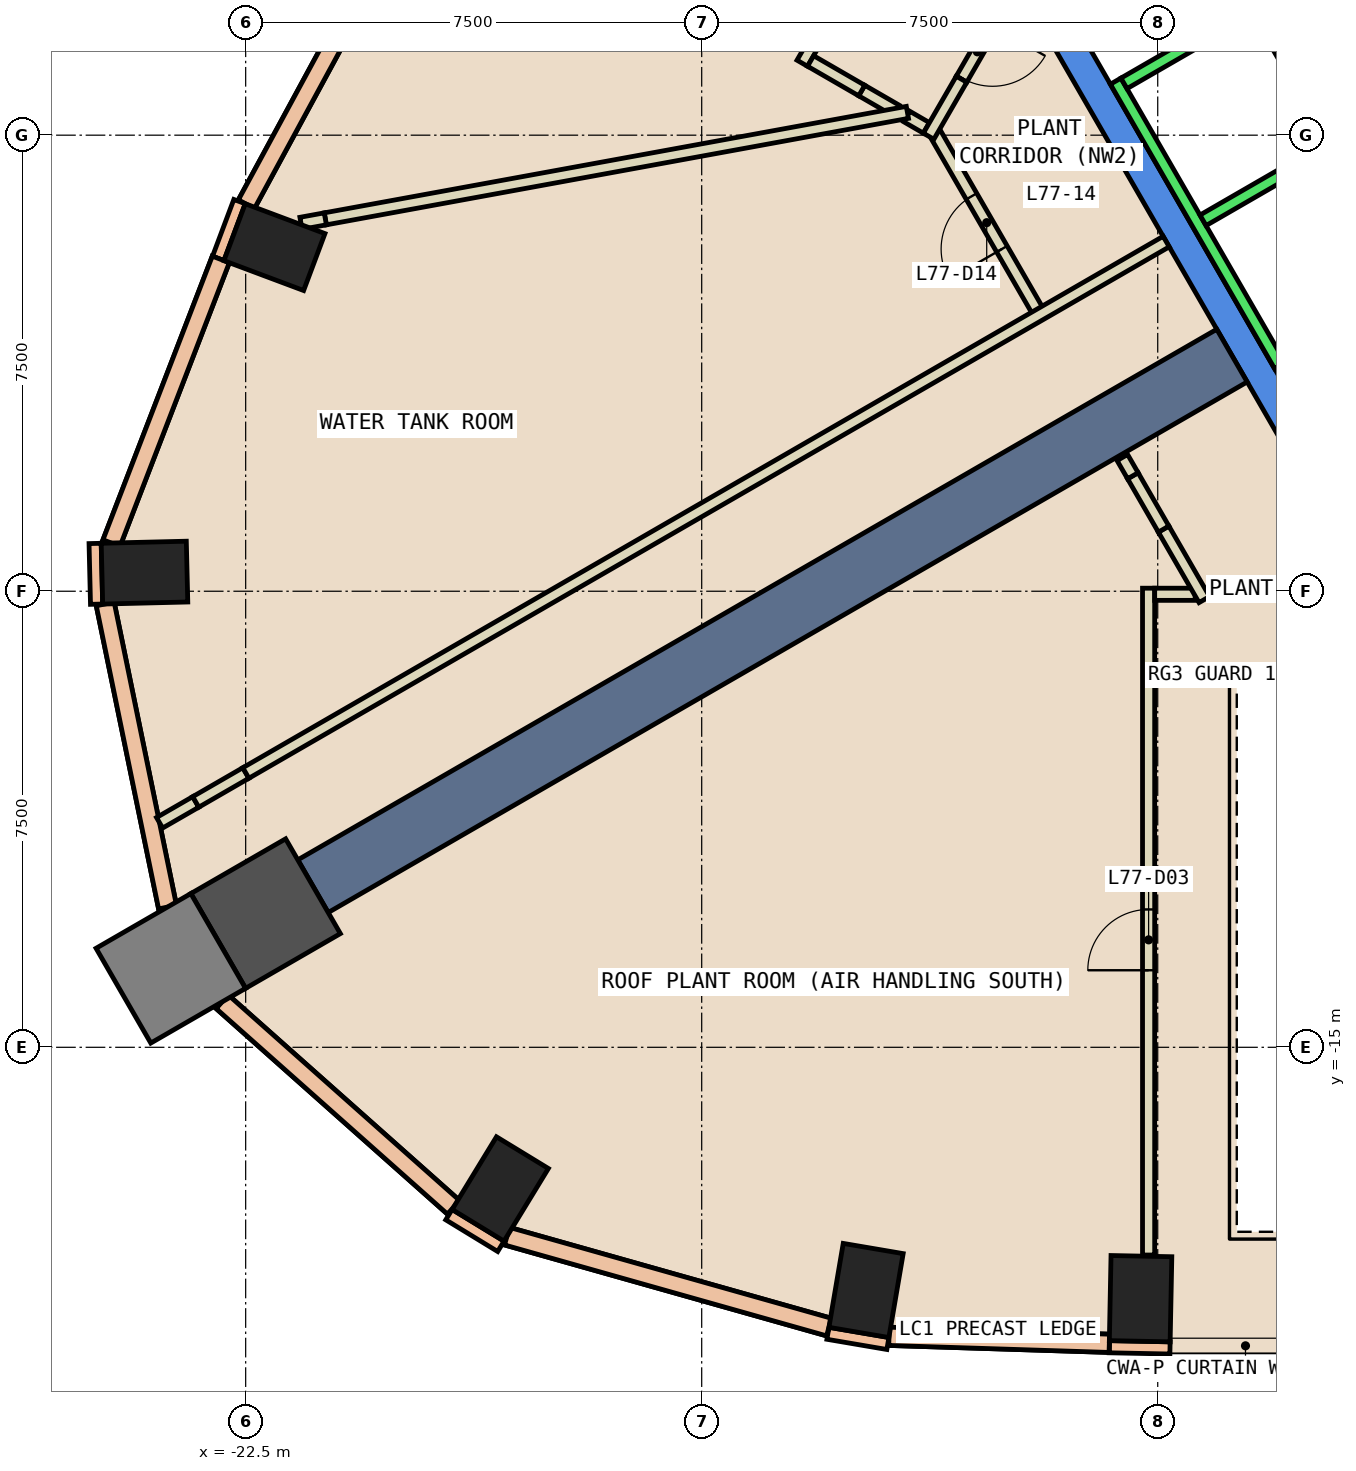
"""IFC4 building model, lengths in metres.
Left out: names, types, materials, properties, quantities, classifications, styles, units other than length and angle.
Written with IfcOpenShell. Run it as: python <this file> out.ifc"""

import sys

from ifc_helpers import new_model, si_unit, direction, frame, frame_2d, origin, origin_2d, place, context, subcontext, project, spatial, polyline, rectangle, outline, extrude, element, fill, save


model = new_model("IFC4")
c1 = context("Model", 3, precision=1e-05, world=origin(), true_north=direction((0.0, 1.0)))
c2 = subcontext(c1, "Body", "Model", "MODEL_VIEW")
j1 = project(units=[si_unit("LENGTHUNIT", "METRE"), si_unit("PLANEANGLEUNIT", "RADIAN")], contexts=[c1])
p1 = place(None, origin())
s1 = spatial("IfcSite", under=j1, at=p1, CompositionType="ELEMENT")
p2 = place(p1, origin())
s2 = spatial("IfcBuilding", under=s1, at=p2, CompositionType="ELEMENT")
p3 = place(p2, frame((0.0, 0.0, 326.0)))
s3 = spatial("IfcBuildingStorey", under=s2, at=p3, CompositionType="ELEMENT", Elevation=326.0)
for number, where, z_axis, x_axis in (
    (1, (-12.297, -18.999, -0.6), (0.0, 0.0, 1.0), (-0.986, 0.168, 0.0)),
    (2, (-7.782, -19.134, -0.6), (0.0, 0.0, 1.0), (-1.0, 0.02, 0.0)),
    (3, (-22.027, -1.841, -0.6), (0.0, 0.0, 1.0), (0.351, 0.936, 0.0)),
    (4, (-24.164, -7.194, -0.6), (0.0, 0.0, 1.0), (-0.024, 1.0, 0.0)),
):
    element("IfcColumn", number, at=place(p3, frame(where, z_axis=z_axis, x_axis=x_axis)), inside=s3, PredefinedType="COLUMN", context=c2, shape_type="SweptSolid", body=[
        extrude(rectangle(XDim=1.0, YDim=1.4, at=origin_2d()), origin(), (0.0, 0.0, 1.0), 5.55),
    ])
p4 = place(p3, frame((-22.172, -12.801, -0.6), z_axis=(0.0, 0.0, 1.0), x_axis=(0.866025403784, 0.5, 0.0)))
e5 = element("IfcColumn", 5, at=p4, inside=s3, PredefinedType="COLUMN", context=c2, shape_type="SweptSolid", body=[
    extrude(rectangle(XDim=1.8, YDim=1.8, at=origin_2d()), origin(), (0.0, 0.0, 1.0), 5.55),
])
p5 = place(p3, frame((-18.313, -17.33, -0.6), z_axis=(0.0, 0.0, 1.0), x_axis=(-0.853650808213, 0.520845752251, 0.0)))
e6 = element("IfcColumn", 6, at=p5, inside=s3, PredefinedType="COLUMN", context=c2, shape_type="SweptSolid", body=[
    extrude(rectangle(XDim=1.0, YDim=1.4, at=origin_2d()), origin(), (0.0, 0.0, 1.0), 5.55),
])
p6 = place(p3, frame((-23.731, -13.701, -0.6), z_axis=(0.0, 0.0, 1.0), x_axis=(0.866025403784, 0.5, 0.0)))
e7 = element("IfcColumn", 7, at=p6, inside=s3, PredefinedType="COLUMN", context=c2, shape_type="SweptSolid", body=[
    extrude(rectangle(XDim=1.8, YDim=1.8, at=origin_2d()), origin(), (0.0, 0.0, 1.0), 5.55),
])
p7 = place(p3, frame((0.0, 0.0, -0.6)))
e8 = element("IfcWall", 8, at=p7, inside=s3, PredefinedType="SHEAR", context=c2, shape_type="SweptSolid", body=[
    extrude(outline(polyline([(-9.815, 2.5), (-4.907, -6.0), (-4.619, -5.5), (-9.238, 2.5), (-9.815, 2.5)])), origin(), (0.0, 0.0, 1.0), 5.55),
])
p8 = place(p3, frame((-6.279, -3.625, 0.0), z_axis=(0.0, 0.0, 1.0), x_axis=(-0.866025543801, -0.499999757484, 0.0)))
e9 = element("IfcWall", 9, at=p8, inside=s3, PredefinedType="SHEAR", context=c2, shape_type="SweptSolid", body=[
    extrude(rectangle(XDim=17.452, YDim=1.0, at=frame_2d((8.726, 0.0))), origin(), (0.0, 0.0, 1.0), 4.95),
])
p9 = place(p3, frame((-22.601, -1.092, 0.0), z_axis=(0.0, 0.0, 1.0), x_axis=(-0.350962844851, -0.936389385637, 0.0)))
e10 = element("IfcWall", 10, at=p9, inside=s3, PredefinedType="STANDARD", context=c2, shape_type="SweptSolid", body=[
    extrude(rectangle(XDim=1.0, YDim=0.2, at=frame_2d((0.5, 0.0))), origin(), (0.0, 0.0, 1.0), 4.95),
])
for number, where, z_axis, x_axis in (
    (11, (-12.924, -19.703, 0.0), (0.0, 0.0, 1.0), (0.986, -0.168, 0.0)),
    (12, (-8.298, -19.924, 0.0), (0.0, 0.0, 1.0), (1.0, -0.02, 0.0)),
):
    element("IfcWall", number, at=place(p3, frame(where, z_axis=z_axis, x_axis=x_axis)), inside=s3, PredefinedType="STANDARD", context=c2, shape_type="SweptSolid", body=[
        extrude(rectangle(XDim=1.0, YDim=0.2, at=frame_2d((0.5, 0.0))), origin(), (0.0, 0.0, 1.0), 4.95),
    ])
p10 = place(p3, frame((-24.976, -6.714, 0.0), z_axis=(0.0, 0.0, 1.0), x_axis=(0.024192379573, -0.999707321555, 0.0)))
e13 = element("IfcWall", 13, at=p10, inside=s3, PredefinedType="STANDARD", context=c2, shape_type="SweptSolid", body=[
    extrude(rectangle(XDim=0.999, YDim=0.2, at=frame_2d((0.5, 0.0))), origin(), (0.0, 0.0, 1.0), 4.95),
])
p11 = place(p3, frame((-19.157, -17.752, 0.0), z_axis=(0.0, 0.0, 1.0), x_axis=(0.853679739553, -0.520798331677, 0.0)))
e14 = element("IfcWall", 14, at=p11, inside=s3, PredefinedType="STANDARD", context=c2, shape_type="SweptSolid", body=[
    extrude(rectangle(XDim=1.0, YDim=0.2, at=frame_2d((0.5, 0.0))), origin(), (0.0, 0.0, 1.0), 4.95),
])
p12 = place(p3, frame((-11.919, -19.753, 0.0), z_axis=(0.0, 0.0, 1.0), x_axis=(0.9994967126, -0.031722570865, 0.0)))
e15 = element("IfcWall", 15, at=p12, inside=s3, PredefinedType="STANDARD", context=c2, shape_type="SweptSolid", body=[
    extrude(rectangle(XDim=3.625, YDim=0.3, at=frame_2d((1.812, 0.0))), origin(), (0.0, 0.0, 1.0), 1.2),
])
p13 = place(p3, frame((-11.919, -19.753, 4.15), z_axis=(0.0, 0.0, 1.0), x_axis=(0.9994967126, -0.031722570865, 0.0)))
e16 = element("IfcWall", 16, at=p13, inside=s3, PredefinedType="STANDARD", context=c2, shape_type="SweptSolid", body=[
    extrude(rectangle(XDim=3.625, YDim=0.3, at=frame_2d((1.812, 0.0))), origin(), (0.0, 0.0, 1.0), 0.8),
])
p14 = place(p3, frame((-18.887, 5.504, 0.0), z_axis=(0.0, 0.0, 1.0), x_axis=(-0.476794367741, -0.879014863862, 0.0)))
e17 = element("IfcWall", 17, at=p14, inside=s3, PredefinedType="STANDARD", context=c2, shape_type="SweptSolid", body=[
    extrude(rectangle(XDim=7.553, YDim=0.3, at=frame_2d((3.776, 0.0))), origin(), (0.0, 0.0, 1.0), 1.2),
])
p15 = place(p3, frame((-18.887, 5.504, 4.15), z_axis=(0.0, 0.0, 1.0), x_axis=(-0.476794367741, -0.879014863862, 0.0)))
e18 = element("IfcWall", 18, at=p15, inside=s3, PredefinedType="STANDARD", context=c2, shape_type="SweptSolid", body=[
    extrude(rectangle(XDim=7.553, YDim=0.3, at=frame_2d((3.776, 0.0))), origin(), (0.0, 0.0, 1.0), 0.8),
])
p16 = place(p3, frame((-22.909, -2.043, 0.0), z_axis=(0.0, 0.0, 1.0), x_axis=(-0.35964980127, -0.933087359493, 0.0)))
e19 = element("IfcWall", 19, at=p16, inside=s3, PredefinedType="STANDARD", context=c2, shape_type="SweptSolid", body=[
    extrude(rectangle(XDim=5.0, YDim=0.3, at=frame_2d((2.5, 0.0))), origin(), (0.0, 0.0, 1.0), 1.2),
])
p17 = place(p3, frame((-22.909, -2.043, 4.15), z_axis=(0.0, 0.0, 1.0), x_axis=(-0.35964980127, -0.933087359493, 0.0)))
e20 = element("IfcWall", 20, at=p17, inside=s3, PredefinedType="STANDARD", context=c2, shape_type="SweptSolid", body=[
    extrude(rectangle(XDim=5.0, YDim=0.3, at=frame_2d((2.5, 0.0))), origin(), (0.0, 0.0, 1.0), 0.8),
])
p18 = place(p3, frame((-24.81, -7.709, 0.0), z_axis=(0.0, 0.0, 1.0), x_axis=(0.201426878117, -0.979503554242, 0.0)))
e21 = element("IfcWall", 21, at=p18, inside=s3, PredefinedType="STANDARD", context=c2, shape_type="SweptSolid", body=[
    extrude(rectangle(XDim=5.089, YDim=0.3, at=frame_2d((2.545, 0.0))), origin(), (0.0, 0.0, 1.0), 1.2),
])
p19 = place(p3, frame((-24.81, -7.709, 4.15), z_axis=(0.0, 0.0, 1.0), x_axis=(0.201426878117, -0.979503554242, 0.0)))
e22 = element("IfcWall", 22, at=p19, inside=s3, PredefinedType="STANDARD", context=c2, shape_type="SweptSolid", body=[
    extrude(rectangle(XDim=5.089, YDim=0.3, at=frame_2d((2.545, 0.0))), origin(), (0.0, 0.0, 1.0), 0.8),
])
p20 = place(p3, frame((-22.886, -14.251, 0.0), z_axis=(0.0, 0.0, 1.0), x_axis=(0.74752312802, -0.664235781236, 0.0)))
e23 = element("IfcWall", 23, at=p20, inside=s3, PredefinedType="STANDARD", context=c2, shape_type="SweptSolid", body=[
    extrude(rectangle(XDim=5.089, YDim=0.3, at=frame_2d((2.544, 0.0))), origin(), (0.0, 0.0, 1.0), 1.2),
])
p21 = place(p3, frame((-22.886, -14.251, 4.15), z_axis=(0.0, 0.0, 1.0), x_axis=(0.74752312802, -0.664235781236, 0.0)))
e24 = element("IfcWall", 24, at=p21, inside=s3, PredefinedType="STANDARD", context=c2, shape_type="SweptSolid", body=[
    extrude(rectangle(XDim=5.089, YDim=0.3, at=frame_2d((2.544, 0.0))), origin(), (0.0, 0.0, 1.0), 0.8),
])
p22 = place(p3, frame((-18.202, -18.106, 0.0), z_axis=(0.0, 0.0, 1.0), x_axis=(0.962383071313, -0.271696198079, 0.0)))
e25 = element("IfcWall", 25, at=p22, inside=s3, PredefinedType="STANDARD", context=c2, shape_type="SweptSolid", body=[
    extrude(rectangle(XDim=5.503, YDim=0.3, at=frame_2d((2.751, 0.0))), origin(), (0.0, 0.0, 1.0), 1.2),
])
p23 = place(p3, frame((-18.202, -18.106, 4.15), z_axis=(0.0, 0.0, 1.0), x_axis=(0.962383071313, -0.271696198079, 0.0)))
e26 = element("IfcWall", 26, at=p23, inside=s3, PredefinedType="STANDARD", context=c2, shape_type="SweptSolid", body=[
    extrude(rectangle(XDim=5.503, YDim=0.3, at=frame_2d((2.751, 0.0))), origin(), (0.0, 0.0, 1.0), 0.8),
])
p24 = place(p3, frame((-7.65, -18.416, 0.0), z_axis=(0.0, 0.0, 1.0), x_axis=(0.0, 1.0, 0.0)))
e27 = element("IfcWall", 27, at=p24, inside=s3, PredefinedType="PARTITIONING", context=c2, shape_type="SweptSolid", body=[
    extrude(rectangle(XDim=10.966, YDim=0.2, at=frame_2d((5.483, 0.0))), origin(), (0.0, 0.0, 1.0), 4.95),
])
p25 = place(p24, frame((4.683, 0.0, 0.0)))
e28 = element("IfcOpeningElement", 28, at=p25, cuts=e27, PredefinedType="OPENING", context=c2, shape_type="SweptSolid", body=[
    extrude(rectangle(XDim=1.0, YDim=2.1, at=frame_2d((0.5, 1.05))), frame((0.0, 0.11, 0.0), z_axis=(0.0, -1.0, 0.0), x_axis=(1.0, 0.0, 0.0)), (0.0, 0.0, 1.0), 0.22),
])
p26 = place(p3, frame((-7.55, -7.55, 0.0), z_axis=(0.0, 0.0, 1.0), x_axis=(1.0, 0.0, 0.0)))
e29 = element("IfcWall", 29, at=p26, inside=s3, PredefinedType="PARTITIONING", context=c2, shape_type="SweptSolid", body=[
    extrude(rectangle(XDim=0.666, YDim=0.2, at=frame_2d((0.333, 0.0))), origin(), (0.0, 0.0, 1.0), 4.95),
])
p27 = place(p3, frame((-6.734, -7.637, 0.0), z_axis=(0.0, 0.0, 1.0), x_axis=(-0.500043546414, 0.866000260791, 0.0)))
e30 = element("IfcWall", 30, at=p27, inside=s3, PredefinedType="PARTITIONING", context=c2, shape_type="SweptSolid", body=[
    extrude(rectangle(XDim=1.338, YDim=0.2, at=frame_2d((0.669, 0.0))), origin(), (0.0, 0.0, 1.0), 4.95),
])
p28 = place(p3, frame((-23.916, -11.308, 0.0), z_axis=(0.0, 0.0, 1.0), x_axis=(0.866333505267, 0.499465972466, 0.0)))
e31 = element("IfcWall", 31, at=p28, inside=s3, PredefinedType="PARTITIONING", context=c2, shape_type="SweptSolid", body=[
    extrude(rectangle(XDim=0.687, YDim=0.2, at=frame_2d((0.343, 0.0))), origin(), (0.0, 0.0, 1.0), 4.95),
])
p29 = place(p3, frame((-11.802, 0.407, 0.0), z_axis=(0.0, 0.0, 1.0), x_axis=(-0.865911816314, 0.500196687681, 0.0)))
e32 = element("IfcWall", 32, at=p29, inside=s3, PredefinedType="PARTITIONING", context=c2, shape_type="SweptSolid", body=[
    extrude(rectangle(XDim=0.654, YDim=0.2, at=frame_2d((0.327, 0.0))), origin(), (0.0, 0.0, 1.0), 4.95),
])
p30 = place(p3, frame((-13.346, 1.183, 0.0), z_axis=(0.0, 0.0, 1.0), x_axis=(0.500230888849, 0.865892059001, 0.0)))
e33 = element("IfcWall", 33, at=p30, inside=s3, PredefinedType="PARTITIONING", context=c2, shape_type="SweptSolid", body=[
    extrude(rectangle(XDim=0.61, YDim=0.2, at=frame_2d((0.305, 0.0))), origin(), (0.0, 0.0, 1.0), 2.55),
])
p31 = place(p3, frame((-11.305, 0.12, 0.0), z_axis=(0.0, 0.0, 1.0), x_axis=(-0.865694957185, 0.500571914019, 0.0)))
e34 = element("IfcWall", 34, at=p31, inside=s3, PredefinedType="PARTITIONING", context=c2, shape_type="SweptSolid", body=[
    extrude(rectangle(XDim=0.373, YDim=0.2, at=frame_2d((0.187, 0.0))), origin(), (0.0, 0.0, 1.0), 4.95),
])
p32 = place(p3, frame((-9.44, -2.95, 0.0), z_axis=(0.0, 0.0, 1.0), x_axis=(-0.500008478926, 0.866020508419, 0.0)))
e35 = element("IfcWall", 35, at=p32, inside=s3, PredefinedType="PARTITIONING", context=c2, shape_type="SweptSolid", body=[
    extrude(rectangle(XDim=3.522, YDim=0.2, at=frame_2d((1.761, 0.0))), origin(), (0.0, 0.0, 1.0), 4.95),
])
p33 = place(p32, frame((1.245, 0.0, 0.0)))
e36 = element("IfcOpeningElement", 36, at=p33, cuts=e35, PredefinedType="OPENING", context=c2, shape_type="SweptSolid", body=[
    extrude(rectangle(XDim=1.0, YDim=2.1, at=frame_2d((0.5, 1.05))), frame((0.0, 0.11, 0.0), z_axis=(0.0, -1.0, 0.0), x_axis=(1.0, 0.0, 0.0)), (0.0, 0.0, 1.0), 0.22),
])
p34 = place(p3, frame((-11.617, 0.375, 0.0), z_axis=(0.0, 0.0, 1.0), x_axis=(-0.983680709819, -0.179922931086, 0.0)))
e37 = element("IfcWall", 37, at=p34, inside=s3, PredefinedType="PARTITIONING", context=c2, shape_type="SweptSolid", body=[
    extrude(rectangle(XDim=9.732, YDim=0.2, at=frame_2d((4.866, 0.0))), origin(), (0.0, 0.0, 1.0), 4.95),
])
p35 = place(p3, frame((-7.403, -6.478, 0.0), z_axis=(0.0, 0.0, 1.0), x_axis=(-0.499666781426, 0.866217702163, 0.0)))
e38 = element("IfcWall", 38, at=p35, inside=s3, PredefinedType="PARTITIONING", context=c2, shape_type="SweptSolid", body=[
    extrude(rectangle(XDim=1.012, YDim=0.2, at=frame_2d((0.506, 0.0))), origin(), (0.0, 0.0, 1.0), 2.55),
])
p36 = place(p3, frame((-7.909, -5.601, 0.0), z_axis=(0.0, 0.0, 1.0), x_axis=(-0.499702115105, 0.866197319414, 0.0)))
e39 = element("IfcWall", 39, at=p36, inside=s3, PredefinedType="PARTITIONING", context=c2, shape_type="SweptSolid", body=[
    extrude(rectangle(XDim=0.346, YDim=0.2, at=frame_2d((0.173, 0.0))), origin(), (0.0, 0.0, 1.0), 4.95),
])
p37 = place(p3, frame((-23.321, -10.965, 0.0), z_axis=(0.0, 0.0, 1.0), x_axis=(0.865865073245, 0.500277597875, 0.0)))
e40 = element("IfcWall", 40, at=p37, inside=s3, PredefinedType="PARTITIONING", context=c2, shape_type="SweptSolid", body=[
    extrude(rectangle(XDim=0.952, YDim=0.2, at=frame_2d((0.476, 0.0))), origin(), (0.0, 0.0, 1.0), 2.55),
])
p38 = place(p3, frame((-22.497, -10.489, 0.0), z_axis=(0.0, 0.0, 1.0), x_axis=(0.866019262169, 0.500010637439, 0.0)))
e41 = element("IfcWall", 41, at=p38, inside=s3, PredefinedType="PARTITIONING", context=c2, shape_type="SweptSolid", body=[
    extrude(rectangle(XDim=17.478, YDim=0.2, at=frame_2d((8.739, 0.0))), origin(), (0.0, 0.0, 1.0), 4.95),
])
p39 = place(p3, frame((-10.101, 2.004, 0.0), z_axis=(0.0, 0.0, 1.0), x_axis=(-0.50008261738, -0.865977699363, 0.0)))
e42 = element("IfcWall", 42, at=p39, inside=s3, PredefinedType="PARTITIONING", context=c2, shape_type="SweptSolid", body=[
    extrude(rectangle(XDim=1.252, YDim=0.2, at=frame_2d((0.626, 0.0))), origin(), (0.0, 0.0, 1.0), 2.55),
])
p40 = place(p39, frame((0.231, 0.0, 0.0)))
e43 = element("IfcOpeningElement", 43, at=p40, cuts=e42, PredefinedType="OPENING", context=c2, shape_type="SweptSolid", body=[
    extrude(rectangle(XDim=1.0, YDim=2.1, at=frame_2d((0.5, 1.05))), frame((0.0, 0.11, 0.0), z_axis=(0.0, -1.0, 0.0), x_axis=(1.0, 0.0, 0.0)), (0.0, 0.0, 1.0), 0.22),
])
p41 = place(p3, frame((-10.727, 0.92, 0.0), z_axis=(0.0, 0.0, 1.0), x_axis=(-0.500021943523, -0.866012734315, 0.0)))
e44 = element("IfcWall", 44, at=p41, inside=s3, PredefinedType="PARTITIONING", context=c2, shape_type="SweptSolid", body=[
    extrude(rectangle(XDim=1.082, YDim=0.2, at=frame_2d((0.541, 0.0))), origin(), (0.0, 0.0, 1.0), 4.95),
])
p42 = place(p3, frame((-12.368, 0.734, 0.0), z_axis=(0.0, 0.0, 1.0), x_axis=(-0.865804585852, 0.500382272985, 0.0)))
e45 = element("IfcWall", 45, at=p42, inside=s3, PredefinedType="PARTITIONING", context=c2, shape_type="SweptSolid", body=[
    extrude(rectangle(XDim=0.971, YDim=0.2, at=frame_2d((0.486, 0.0))), origin(), (0.0, 0.0, 1.0), 2.55),
])
p43 = place(p3, frame((-21.19, -1.376, 0.0), z_axis=(0.0, 0.0, 1.0), x_axis=(-0.983764099446, -0.179466422046, 0.0)))
e46 = element("IfcWall", 46, at=p43, inside=s3, PredefinedType="PARTITIONING", context=c2, shape_type="SweptSolid", body=[
    extrude(rectangle(XDim=0.407, YDim=0.2, at=frame_2d((0.203, 0.0))), origin(), (0.0, 0.0, 1.0), 2.55),
])
p44 = place(p3, frame((-5.94, 2.188, 0.0), z_axis=(0.0, 0.0, 1.0), x_axis=(0.500034260056, -0.866005622828, 0.0)))
e47 = element("IfcWall", 47, at=p44, inside=s3, PredefinedType="STANDARD", context=c2, shape_type="SweptSolid", body=[
    extrude(rectangle(XDim=5.399, YDim=0.2, at=frame_2d((2.7, 0.0))), origin(), (0.0, 0.0, 1.0), 4.95),
])
p45 = place(p44, frame((3.075, 0.0, 0.0)))
e48 = element("IfcOpeningElement", 48, at=p45, cuts=e47, PredefinedType="OPENING", context=c2, shape_type="SweptSolid", body=[
    extrude(rectangle(XDim=1.1, YDim=2.1, at=frame_2d((0.55, 1.05))), frame((0.0, 0.11, 0.0), z_axis=(0.0, -1.0, 0.0), x_axis=(1.0, 0.0, 0.0)), (0.0, 0.0, 1.0), 0.22),
])
p46 = place(p44, frame((1.225, 0.0, 0.0)))
e49 = element("IfcOpeningElement", 49, at=p46, cuts=e47, PredefinedType="OPENING", context=c2, shape_type="SweptSolid", body=[
    extrude(rectangle(XDim=1.1, YDim=2.1, at=frame_2d((0.55, 1.05))), frame((0.0, 0.11, 0.0), z_axis=(0.0, -1.0, 0.0), x_axis=(1.0, 0.0, 0.0)), (0.0, 0.0, 1.0), 0.22),
])
p47 = place(p3, frame((-8.192, 0.888, 0.0), z_axis=(0.0, 0.0, 1.0), x_axis=(0.500034260056, -0.866005622828, 0.0)))
e50 = element("IfcWall", 50, at=p47, inside=s3, PredefinedType="STANDARD", context=c2, shape_type="SweptSolid", body=[
    extrude(rectangle(XDim=5.399, YDim=0.2, at=frame_2d((2.7, 0.0))), origin(), (0.0, 0.0, 1.0), 4.95),
])
for number, where, z_axis, x_axis in (
    (51, (-5.977, 2.052, 0.0), (0.0, 0.0, 1.0), (-0.866, -0.5, 0.0)),
    (52, (-4.677, -0.2, 0.0), (0.0, 0.0, 1.0), (-0.866, -0.5, 0.0)),
):
    element("IfcWall", number, at=place(p3, frame(where, z_axis=z_axis, x_axis=x_axis)), inside=s3, PredefinedType="STANDARD", context=c2, shape_type="SweptSolid", body=[
        extrude(rectangle(XDim=2.399, YDim=0.2, at=frame_2d((1.2, 0.0))), origin(), (0.0, 0.0, 1.0), 4.95),
    ])
p48 = place(p25, origin())
e53 = element("IfcDoor", 53, at=p48, inside=s3, OperationType="SINGLE_SWING_RIGHT", PredefinedType="DOOR", context=c2, shape_type="SweptSolid", body=[
    extrude(rectangle(XDim=1.0, YDim=2.1, at=frame_2d((0.5, 1.05))), frame((0.0, 0.025, 0.0), z_axis=(0.0, -1.0, 0.0), x_axis=(1.0, 0.0, 0.0)), (0.0, 0.0, 1.0), 0.05),
])
fill(e28, e53)
p49 = place(p40, origin())
e54 = element("IfcDoor", 54, at=p49, inside=s3, OperationType="SINGLE_SWING_RIGHT", PredefinedType="DOOR", context=c2, shape_type="SweptSolid", body=[
    extrude(rectangle(XDim=1.0, YDim=2.1, at=frame_2d((0.5, 1.05))), frame((0.0, 0.025, 0.0), z_axis=(0.0, -1.0, 0.0), x_axis=(1.0, 0.0, 0.0)), (0.0, 0.0, 1.0), 0.05),
])
fill(e43, e54)
p50 = place(p33, origin())
e55 = element("IfcDoor", 55, at=p50, inside=s3, OperationType="SINGLE_SWING_LEFT", PredefinedType="DOOR", context=c2, shape_type="SweptSolid", body=[
    extrude(rectangle(XDim=1.0, YDim=2.1, at=frame_2d((0.5, 1.05))), frame((0.0, 0.025, 0.0), z_axis=(0.0, -1.0, 0.0), x_axis=(1.0, 0.0, 0.0)), (0.0, 0.0, 1.0), 0.05),
])
fill(e36, e55)
save(model, sys.argv[1])
